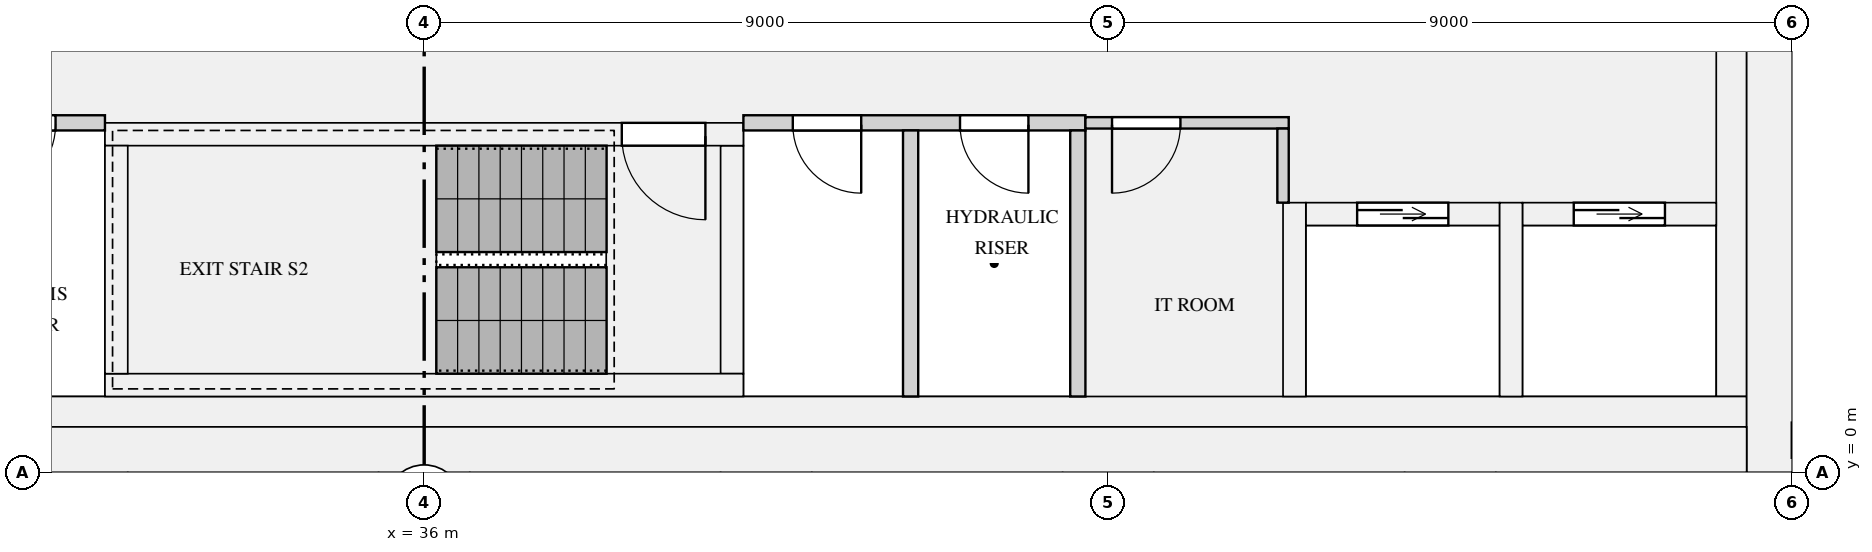
"""IFC4 building model, lengths in metres.
Left out: names, types, materials, properties, quantities, classifications, styles, units other than length and angle.
Written with IfcOpenShell. Run it as: python <this file> out.ifc"""

import sys

from ifc_helpers import new_model, si_unit, direction, frame, frame_2d, origin, place, context, subcontext, project, spatial, rectangle, extrude, element, fill, save


model = new_model("IFC4")
c1 = context("Model", 3, precision=1e-05, world=origin(), true_north=direction((0.0, 1.0)))
c2 = subcontext(c1, "Body", "Model", "MODEL_VIEW")
j1 = project(units=[si_unit("LENGTHUNIT", "METRE"), si_unit("PLANEANGLEUNIT", "RADIAN")], contexts=[c1])
p1 = place(None, origin())
s1 = spatial("IfcSite", under=j1, at=p1, CompositionType="ELEMENT")
p2 = place(p1, origin())
s2 = spatial("IfcBuilding", under=s1, at=p2, CompositionType="ELEMENT")
p3 = place(p2, frame((0.0, 0.0, 198.0)))
s3 = spatial("IfcBuildingStorey", under=s2, at=p3, CompositionType="ELEMENT", Elevation=198.0)
p4 = place(p3, frame((53.7, 0.0, 0.0), z_axis=(0.0, 0.0, 1.0), x_axis=(0.0, 1.0, 0.0)))
e1 = element("IfcWall", 1, at=p4, inside=s3, PredefinedType="SHEAR", context=c2, shape_type="SweptSolid", body=[
    extrude(rectangle(XDim=12.5, YDim=0.6, at=frame_2d((6.25, 0.0))), origin(), (0.0, 0.0, 1.0), 3.15),
])
p5 = place(p3, frame((18.6, 0.3, 0.0), z_axis=(0.0, 0.0, 1.0), x_axis=(1.0, 0.0, 0.0)))
e2 = element("IfcWall", 2, at=p5, inside=s3, PredefinedType="SHEAR", context=c2, shape_type="SweptSolid", body=[
    extrude(rectangle(XDim=34.8, YDim=0.6, at=frame_2d((17.4, 0.0))), origin(), (0.0, 0.0, 1.0), 3.15),
])
p6 = place(p3, frame((53.2, 1.0, 0.0), z_axis=(0.0, 0.0, 1.0), x_axis=(0.0, 1.0, 0.0)))
e3 = element("IfcWall", 3, at=p6, inside=s3, PredefinedType="SHEAR", context=c2, shape_type="SweptSolid", body=[
    extrude(rectangle(XDim=10.9, YDim=0.4, at=frame_2d((5.45, 0.0))), origin(), (0.0, 0.0, 1.0), 3.15),
])
p7 = place(p3, frame((18.6, 0.8, 0.0), z_axis=(0.0, 0.0, 1.0), x_axis=(1.0, 0.0, 0.0)))
e4 = element("IfcWall", 4, at=p7, inside=s3, PredefinedType="SHEAR", context=c2, shape_type="SweptSolid", body=[
    extrude(rectangle(XDim=34.8, YDim=0.4, at=frame_2d((17.4, 0.0))), origin(), (0.0, 0.0, 1.0), 3.15),
])
p8 = place(p3, frame((47.6, 3.4, 0.0), z_axis=(0.0, 0.0, 1.0), x_axis=(1.0, 0.0, 0.0)))
e5 = element("IfcWall", 5, at=p8, inside=s3, PredefinedType="SHEAR", context=c2, shape_type="SweptSolid", body=[
    extrude(rectangle(XDim=2.55, YDim=0.3, at=frame_2d((1.275, 0.0))), origin(), (0.0, 0.0, 1.0), 3.15),
])
p9 = place(p8, frame((0.675, 0.0, 0.0)))
e6 = element("IfcOpeningElement", 6, at=p9, cuts=e5, PredefinedType="OPENING", context=c2, shape_type="SweptSolid", body=[
    extrude(rectangle(XDim=1.2, YDim=2.1, at=frame_2d((0.6, 1.05))), frame((0.0, 0.16, 0.0), z_axis=(0.0, -1.0, 0.0), x_axis=(1.0, 0.0, 0.0)), (0.0, 0.0, 1.0), 0.32),
])
p10 = place(p3, frame((47.45, 1.0, 0.0), z_axis=(0.0, 0.0, 1.0), x_axis=(0.0, 1.0, 0.0)))
e7 = element("IfcWall", 7, at=p10, inside=s3, PredefinedType="SHEAR", context=c2, shape_type="SweptSolid", body=[
    extrude(rectangle(XDim=2.55, YDim=0.3, at=frame_2d((1.275, 0.0))), origin(), (0.0, 0.0, 1.0), 3.15),
])
p11 = place(p3, frame((50.45, 3.4, 0.0), z_axis=(0.0, 0.0, 1.0), x_axis=(1.0, 0.0, 0.0)))
e8 = element("IfcWall", 8, at=p11, inside=s3, PredefinedType="SHEAR", context=c2, shape_type="SweptSolid", body=[
    extrude(rectangle(XDim=2.55, YDim=0.3, at=frame_2d((1.275, 0.0))), origin(), (0.0, 0.0, 1.0), 3.15),
])
p12 = place(p11, frame((0.675, 0.0, 0.0)))
e9 = element("IfcOpeningElement", 9, at=p12, cuts=e8, PredefinedType="OPENING", context=c2, shape_type="SweptSolid", body=[
    extrude(rectangle(XDim=1.2, YDim=2.1, at=frame_2d((0.6, 1.05))), frame((0.0, 0.16, 0.0), z_axis=(0.0, -1.0, 0.0), x_axis=(1.0, 0.0, 0.0)), (0.0, 0.0, 1.0), 0.32),
])
p13 = place(p3, frame((50.3, 1.0, 0.0), z_axis=(0.0, 0.0, 1.0), x_axis=(0.0, 1.0, 0.0)))
e10 = element("IfcWall", 10, at=p13, inside=s3, PredefinedType="SHEAR", context=c2, shape_type="SweptSolid", body=[
    extrude(rectangle(XDim=2.55, YDim=0.3, at=frame_2d((1.275, 0.0))), origin(), (0.0, 0.0, 1.0), 3.15),
])
p14 = place(p3, frame((31.8, 1.15, 0.0), z_axis=(0.0, 0.0, 1.0), x_axis=(1.0, 0.0, 0.0)))
e11 = element("IfcWall", 11, at=p14, inside=s3, PredefinedType="SHEAR", context=c2, shape_type="SweptSolid", body=[
    extrude(rectangle(XDim=8.4, YDim=0.3, at=frame_2d((4.2, 0.0))), origin(), (0.0, 0.0, 1.0), 3.15),
])
p15 = place(p3, frame((31.8, 4.45, 0.0), z_axis=(0.0, 0.0, 1.0), x_axis=(1.0, 0.0, 0.0)))
e12 = element("IfcWall", 12, at=p15, inside=s3, PredefinedType="SHEAR", context=c2, shape_type="SweptSolid", body=[
    extrude(rectangle(XDim=8.4, YDim=0.3, at=frame_2d((4.2, 0.0))), origin(), (0.0, 0.0, 1.0), 3.15),
])
p16 = place(p15, frame((6.8, 0.0, 0.0)))
e13 = element("IfcOpeningElement", 13, at=p16, cuts=e12, PredefinedType="OPENING", context=c2, shape_type="SweptSolid", body=[
    extrude(rectangle(XDim=1.1, YDim=2.1, at=frame_2d((0.55, 1.05))), frame((0.0, 0.16, 0.0), z_axis=(0.0, -1.0, 0.0), x_axis=(1.0, 0.0, 0.0)), (0.0, 0.0, 1.0), 0.32),
])
for number, where, z_axis, x_axis in (
    (14, (31.95, 1.3, 0.0), (0.0, 0.0, 1.0), (0.0, 1.0, 0.0)),
    (15, (40.05, 1.3, 0.0), (0.0, 0.0, 1.0), (0.0, 1.0, 0.0)),
):
    element("IfcWall", number, at=place(p3, frame(where, z_axis=z_axis, x_axis=x_axis)), inside=s3, PredefinedType="SHEAR", context=c2, shape_type="SweptSolid", body=[
        extrude(rectangle(XDim=3.0, YDim=0.3, at=frame_2d((1.5, 0.0))), origin(), (0.0, 0.0, 1.0), 3.15),
    ])
p17 = place(p3, frame((54.0, 0.425, 0.9), z_axis=(0.0, 0.0, 1.0), x_axis=(1.0, 0.0, 0.0)))
e16 = element("IfcWall", 16, at=p17, inside=s3, PredefinedType="SOLIDWALL", context=c2, shape_type="SweptSolid", body=[
    extrude(rectangle(XDim=4.05, YDim=0.45, at=frame_2d((2.025, 0.0))), origin(), (0.0, 0.0, 1.0), 1.93),
])
p18 = place(p17, frame((1.275, 0.0, 0.15)))
e17 = element("IfcOpeningElement", 17, at=p18, cuts=e16, PredefinedType="OPENING", context=c2, shape_type="SweptSolid", body=[
    extrude(rectangle(XDim=1.5, YDim=1.5, at=frame_2d((0.75, 0.75))), frame((0.0, 0.235, 0.0), z_axis=(0.0, -1.0, 0.0), x_axis=(1.0, 0.0, 0.0)), (0.0, 0.0, 1.0), 0.47),
])
p19 = place(p3, frame((27.3, 4.6, 0.0), z_axis=(0.0, 0.0, 1.0), x_axis=(1.0, 0.0, 0.0)))
e18 = element("IfcWall", 18, at=p19, inside=s3, PredefinedType="PARTITIONING", context=c2, shape_type="SweptSolid", body=[
    extrude(rectangle(XDim=4.5, YDim=0.2, at=frame_2d((2.25, 0.0))), origin(), (0.0, 0.0, 1.0), 2.83),
])
p20 = place(p19, frame((0.75, 0.0, 0.0)))
e19 = element("IfcOpeningElement", 19, at=p20, cuts=e18, PredefinedType="OPENING", context=c2, shape_type="SweptSolid", body=[
    extrude(rectangle(XDim=0.9, YDim=2.1, at=frame_2d((0.45, 1.05))), frame((0.0, 0.11, 0.0), z_axis=(0.0, -1.0, 0.0), x_axis=(1.0, 0.0, 0.0)), (0.0, 0.0, 1.0), 0.22),
])
p21 = place(p19, frame((2.95, 0.0, 0.0)))
e20 = element("IfcOpeningElement", 20, at=p21, cuts=e18, PredefinedType="OPENING", context=c2, shape_type="SweptSolid", body=[
    extrude(rectangle(XDim=0.9, YDim=2.1, at=frame_2d((0.45, 1.05))), frame((0.0, 0.11, 0.0), z_axis=(0.0, -1.0, 0.0), x_axis=(1.0, 0.0, 0.0)), (0.0, 0.0, 1.0), 0.22),
])
p22 = place(p3, frame((40.2, 4.6, 0.0), z_axis=(0.0, 0.0, 1.0), x_axis=(1.0, 0.0, 0.0)))
e21 = element("IfcWall", 21, at=p22, inside=s3, PredefinedType="PARTITIONING", context=c2, shape_type="SweptSolid", body=[
    extrude(rectangle(XDim=4.5, YDim=0.2, at=frame_2d((2.25, 0.0))), origin(), (0.0, 0.0, 1.0), 2.83),
])
p23 = place(p22, frame((0.65, 0.0, 0.0)))
e22 = element("IfcOpeningElement", 22, at=p23, cuts=e21, PredefinedType="OPENING", context=c2, shape_type="SweptSolid", body=[
    extrude(rectangle(XDim=0.9, YDim=2.1, at=frame_2d((0.45, 1.05))), frame((0.0, 0.11, 0.0), z_axis=(0.0, -1.0, 0.0), x_axis=(1.0, 0.0, 0.0)), (0.0, 0.0, 1.0), 0.22),
])
p24 = place(p22, frame((2.85, 0.0, 0.0)))
e23 = element("IfcOpeningElement", 23, at=p24, cuts=e21, PredefinedType="OPENING", context=c2, shape_type="SweptSolid", body=[
    extrude(rectangle(XDim=0.9, YDim=2.1, at=frame_2d((0.45, 1.05))), frame((0.0, 0.11, 0.0), z_axis=(0.0, -1.0, 0.0), x_axis=(1.0, 0.0, 0.0)), (0.0, 0.0, 1.0), 0.22),
])
p25 = place(p3, frame((44.7, 4.6, 0.0), z_axis=(0.0, 0.0, 1.0), x_axis=(1.0, 0.0, 0.0)))
e24 = element("IfcWall", 24, at=p25, inside=s3, PredefinedType="PARTITIONING", context=c2, shape_type="SweptSolid", body=[
    extrude(rectangle(XDim=2.675, YDim=0.15, at=frame_2d((1.337, 0.0))), origin(), (0.0, 0.0, 1.0), 2.83),
])
p26 = place(p25, frame((0.35, 0.0, 0.0)))
e25 = element("IfcOpeningElement", 25, at=p26, cuts=e24, PredefinedType="OPENING", context=c2, shape_type="SweptSolid", body=[
    extrude(rectangle(XDim=0.9, YDim=2.1, at=frame_2d((0.45, 1.05))), frame((0.0, 0.085, 0.0), z_axis=(0.0, -1.0, 0.0), x_axis=(1.0, 0.0, 0.0)), (0.0, 0.0, 1.0), 0.17),
])
for number, where, z_axis, x_axis in (
    (26, (42.4, 1.0, 0.0), (0.0, 0.0, 1.0), (0.0, 1.0, 0.0)),
    (27, (44.6, 1.0, 0.0), (0.0, 0.0, 1.0), (0.0, 1.0, 0.0)),
):
    element("IfcWall", number, at=place(p3, frame(where, z_axis=z_axis, x_axis=x_axis)), inside=s3, PredefinedType="PARTITIONING", context=c2, shape_type="SweptSolid", body=[
        extrude(rectangle(XDim=3.5, YDim=0.2, at=frame_2d((1.75, 0.0))), origin(), (0.0, 0.0, 1.0), 2.83),
    ])
p27 = place(p3, frame((47.3, 3.55, 0.0), z_axis=(0.0, 0.0, 1.0), x_axis=(0.0, 1.0, 0.0)))
e28 = element("IfcWall", 28, at=p27, inside=s3, PredefinedType="PARTITIONING", context=c2, shape_type="SweptSolid", body=[
    extrude(rectangle(XDim=0.975, YDim=0.15, at=frame_2d((0.487, 0.0))), origin(), (0.0, 0.0, 1.0), 2.83),
])
p28 = place(p9, origin())
e29 = element("IfcDoor", 29, at=p28, inside=s3, OperationType="DOUBLE_DOOR_SLIDING", PredefinedType="DOOR", context=c2, shape_type="SweptSolid", body=[
    extrude(rectangle(XDim=1.2, YDim=2.1, at=frame_2d((0.6, 1.05))), frame((0.0, 0.025, 0.0), z_axis=(0.0, -1.0, 0.0), x_axis=(1.0, 0.0, 0.0)), (0.0, 0.0, 1.0), 0.05),
])
fill(e6, e29)
p29 = place(p12, origin())
e30 = element("IfcDoor", 30, at=p29, inside=s3, OperationType="DOUBLE_DOOR_SLIDING", PredefinedType="DOOR", context=c2, shape_type="SweptSolid", body=[
    extrude(rectangle(XDim=1.2, YDim=2.1, at=frame_2d((0.6, 1.05))), frame((0.0, 0.025, 0.0), z_axis=(0.0, -1.0, 0.0), x_axis=(1.0, 0.0, 0.0)), (0.0, 0.0, 1.0), 0.05),
])
fill(e9, e30)
p30 = place(p16, frame((1.1, 0.0, 0.0), z_axis=(0.0, 0.0, 1.0), x_axis=(-1.0, 0.0, 0.0)))
e31 = element("IfcDoor", 31, at=p30, inside=s3, OperationType="SINGLE_SWING_LEFT", PredefinedType="DOOR", context=c2, shape_type="SweptSolid", body=[
    extrude(rectangle(XDim=1.1, YDim=2.1, at=frame_2d((0.55, 1.05))), frame((0.0, 0.025, 0.0), z_axis=(0.0, -1.0, 0.0), x_axis=(1.0, 0.0, 0.0)), (0.0, 0.0, 1.0), 0.05),
])
fill(e13, e31)
p31 = place(p26, frame((0.9, 0.0, 0.0), z_axis=(0.0, 0.0, 1.0), x_axis=(-1.0, 0.0, 0.0)))
e32 = element("IfcDoor", 32, at=p31, inside=s3, OperationType="SINGLE_SWING_RIGHT", PredefinedType="DOOR", context=c2, shape_type="SweptSolid", body=[
    extrude(rectangle(XDim=0.9, YDim=2.1, at=frame_2d((0.45, 1.05))), frame((0.0, 0.025, 0.0), z_axis=(0.0, -1.0, 0.0), x_axis=(1.0, 0.0, 0.0)), (0.0, 0.0, 1.0), 0.05),
])
fill(e25, e32)
p32 = place(p21, frame((0.9, 0.0, 0.0), z_axis=(0.0, 0.0, 1.0), x_axis=(-1.0, 0.0, 0.0)))
e33 = element("IfcDoor", 33, at=p32, inside=s3, OperationType="SINGLE_SWING_RIGHT", PredefinedType="DOOR", context=c2, shape_type="SweptSolid", body=[
    extrude(rectangle(XDim=0.9, YDim=2.1, at=frame_2d((0.45, 1.05))), frame((0.0, 0.025, 0.0), z_axis=(0.0, -1.0, 0.0), x_axis=(1.0, 0.0, 0.0)), (0.0, 0.0, 1.0), 0.05),
])
fill(e20, e33)
p33 = place(p23, frame((0.9, 0.0, 0.0), z_axis=(0.0, 0.0, 1.0), x_axis=(-1.0, 0.0, 0.0)))
e34 = element("IfcDoor", 34, at=p33, inside=s3, OperationType="SINGLE_SWING_LEFT", PredefinedType="DOOR", context=c2, shape_type="SweptSolid", body=[
    extrude(rectangle(XDim=0.9, YDim=2.1, at=frame_2d((0.45, 1.05))), frame((0.0, 0.025, 0.0), z_axis=(0.0, -1.0, 0.0), x_axis=(1.0, 0.0, 0.0)), (0.0, 0.0, 1.0), 0.05),
])
fill(e22, e34)
p34 = place(p24, frame((0.9, 0.0, 0.0), z_axis=(0.0, 0.0, 1.0), x_axis=(-1.0, 0.0, 0.0)))
e35 = element("IfcDoor", 35, at=p34, inside=s3, OperationType="SINGLE_SWING_LEFT", PredefinedType="DOOR", context=c2, shape_type="SweptSolid", body=[
    extrude(rectangle(XDim=0.9, YDim=2.1, at=frame_2d((0.45, 1.05))), frame((0.0, 0.025, 0.0), z_axis=(0.0, -1.0, 0.0), x_axis=(1.0, 0.0, 0.0)), (0.0, 0.0, 1.0), 0.05),
])
fill(e23, e35)
save(model, sys.argv[1])
